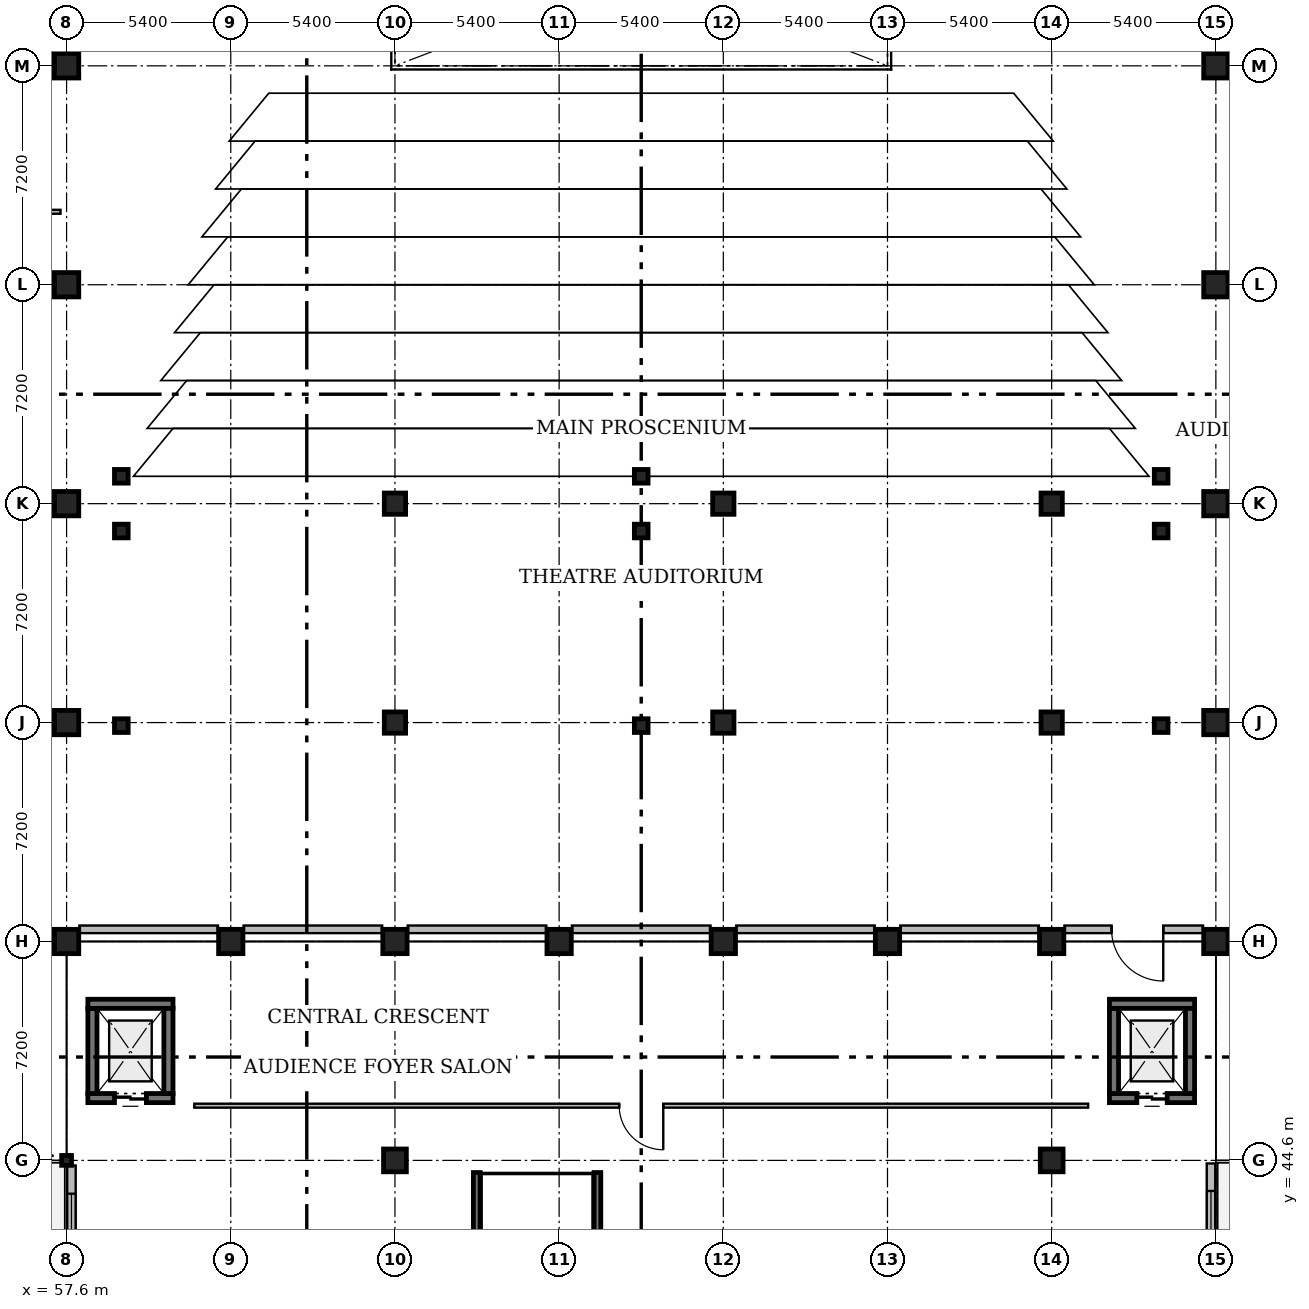
"""IFC4 building model, lengths in metres.
Left out: names, types, materials, properties, quantities, classifications, styles, units other than length and angle.
Written with IfcOpenShell. Run it as: python <this file> out.ifc"""

import sys

from ifc_helpers import new_model, si_unit, direction, frame, frame_2d, origin, origin_2d, place, context, subcontext, project, spatial, rectangle, circle, hollow_circle, extrude, element, fill, save


model = new_model("IFC4")
c1 = context("Model", 3, precision=1e-05, world=origin(), true_north=direction((0.0, 1.0)))
c2 = subcontext(c1, "Body", "Model", "MODEL_VIEW")
j1 = project(units=[si_unit("LENGTHUNIT", "METRE"), si_unit("PLANEANGLEUNIT", "RADIAN")], contexts=[c1])
p1 = place(None, origin())
s1 = spatial("IfcSite", under=j1, at=p1, CompositionType="ELEMENT")
p2 = place(p1, origin())
s2 = spatial("IfcBuilding", under=s1, at=p2, CompositionType="ELEMENT")
p3 = place(p2, origin())
s3 = spatial("IfcBuildingStorey", under=s2, at=p3, CompositionType="ELEMENT", Elevation=0.0)
p4 = place(p3, frame((68.4, 44.6, 0.0), z_axis=(0.0, 0.0, 1.0), x_axis=(1.0, 0.0, 0.0)))
e1 = element("IfcColumn", 1, at=p4, inside=s3, PredefinedType="COLUMN", context=c2, shape_type="SweptSolid", body=[
    extrude(circle(Radius=0.375, at=origin_2d()), origin(), (0.0, 0.0, 1.0), 4.8),
])
p5 = place(p3, frame((68.4, 51.8, 0.0), z_axis=(0.0, 0.0, 1.0), x_axis=(1.0, 0.0, 0.0)))
e2 = element("IfcColumn", 2, at=p5, inside=s3, PredefinedType="COLUMN", context=c2, shape_type="SweptSolid", body=[
    extrude(rectangle(XDim=0.8, YDim=0.8, at=origin_2d()), origin(), (0.0, 0.0, 1.0), 4.8),
])
for number, where, z_axis, x_axis in (
    (3, (68.4, 59.0, 0.0), (0.0, 0.0, 1.0), (1.0, 0.0, 0.0)),
    (4, (68.4, 66.2, 0.0), (0.0, 0.0, 1.0), (1.0, 0.0, 0.0)),
):
    element("IfcColumn", number, at=place(p3, frame(where, z_axis=z_axis, x_axis=x_axis)), inside=s3, PredefinedType="COLUMN", context=c2, shape_type="SweptSolid", body=[
        extrude(rectangle(XDim=0.7, YDim=0.7, at=origin_2d()), origin(), (0.0, 0.0, 1.0), 4.8),
    ])
for number, where, z_axis, x_axis in (
    (5, (73.8, 51.8, 0.0), (0.0, 0.0, 1.0), (1.0, 0.0, 0.0)),
    (6, (79.2, 51.8, 0.0), (0.0, 0.0, 1.0), (1.0, 0.0, 0.0)),
):
    element("IfcColumn", number, at=place(p3, frame(where, z_axis=z_axis, x_axis=x_axis)), inside=s3, PredefinedType="COLUMN", context=c2, shape_type="SweptSolid", body=[
        extrude(rectangle(XDim=0.8, YDim=0.8, at=origin_2d()), origin(), (0.0, 0.0, 1.0), 4.8),
    ])
for number, where, z_axis, x_axis in (
    (7, (79.2, 59.0, 0.0), (0.0, 0.0, 1.0), (1.0, 0.0, 0.0)),
    (8, (79.2, 66.2, 0.0), (0.0, 0.0, 1.0), (1.0, 0.0, 0.0)),
):
    element("IfcColumn", number, at=place(p3, frame(where, z_axis=z_axis, x_axis=x_axis)), inside=s3, PredefinedType="COLUMN", context=c2, shape_type="SweptSolid", body=[
        extrude(rectangle(XDim=0.7, YDim=0.7, at=origin_2d()), origin(), (0.0, 0.0, 1.0), 4.8),
    ])
p6 = place(p3, frame((84.6, 51.8, 0.0), z_axis=(0.0, 0.0, 1.0), x_axis=(1.0, 0.0, 0.0)))
e9 = element("IfcColumn", 9, at=p6, inside=s3, PredefinedType="COLUMN", context=c2, shape_type="SweptSolid", body=[
    extrude(rectangle(XDim=0.8, YDim=0.8, at=origin_2d()), origin(), (0.0, 0.0, 1.0), 4.8),
])
p7 = place(p3, frame((90.0, 44.6, 0.0), z_axis=(0.0, 0.0, 1.0), x_axis=(1.0, 0.0, 0.0)))
e10 = element("IfcColumn", 10, at=p7, inside=s3, PredefinedType="COLUMN", context=c2, shape_type="SweptSolid", body=[
    extrude(circle(Radius=0.375, at=origin_2d()), origin(), (0.0, 0.0, 1.0), 4.8),
])
p8 = place(p3, frame((90.0, 51.8, 0.0), z_axis=(0.0, 0.0, 1.0), x_axis=(1.0, 0.0, 0.0)))
e11 = element("IfcColumn", 11, at=p8, inside=s3, PredefinedType="COLUMN", context=c2, shape_type="SweptSolid", body=[
    extrude(rectangle(XDim=0.8, YDim=0.8, at=origin_2d()), origin(), (0.0, 0.0, 1.0), 4.8),
])
for number, where, z_axis, x_axis in (
    (12, (90.0, 59.0, 0.0), (0.0, 0.0, 1.0), (1.0, 0.0, 0.0)),
    (13, (90.0, 66.2, 0.0), (0.0, 0.0, 1.0), (1.0, 0.0, 0.0)),
):
    element("IfcColumn", number, at=place(p3, frame(where, z_axis=z_axis, x_axis=x_axis)), inside=s3, PredefinedType="COLUMN", context=c2, shape_type="SweptSolid", body=[
        extrude(rectangle(XDim=0.7, YDim=0.7, at=origin_2d()), origin(), (0.0, 0.0, 1.0), 4.8),
    ])
for number, where, z_axis, x_axis in (
    (14, (95.4, 51.8, 0.0), (0.0, 0.0, 1.0), (1.0, 0.0, 0.0)),
    (15, (95.4, 59.0, 0.0), (0.0, 0.0, 1.0), (1.0, 0.0, 0.0)),
    (16, (95.4, 66.2, 0.0), (0.0, 0.0, 1.0), (1.0, 0.0, 0.0)),
    (17, (95.4, 73.4, 0.0), (0.0, 0.0, 1.0), (1.0, 0.0, 0.0)),
    (18, (95.4, 80.6, 0.0), (0.0, 0.0, 1.0), (1.0, 0.0, 0.0)),
):
    element("IfcColumn", number, at=place(p3, frame(where, z_axis=z_axis, x_axis=x_axis)), inside=s3, PredefinedType="COLUMN", context=c2, shape_type="SweptSolid", body=[
        extrude(rectangle(XDim=0.8, YDim=0.8, at=origin_2d()), origin(), (0.0, 0.0, 1.0), 4.8),
    ])
p9 = place(p3, frame((57.6, 44.6, 0.0), z_axis=(0.0, 0.0, 1.0), x_axis=(1.0, 0.0, 0.0)))
e19 = element("IfcColumn", 19, at=p9, inside=s3, PredefinedType="COLUMN", context=c2, shape_type="SweptSolid", body=[
    extrude(hollow_circle(Radius=0.162, WallThickness=0.012, at=origin_2d()), origin(), (0.0, 0.0, 1.0), 4.8),
])
for number, where, z_axis, x_axis in (
    (20, (57.6, 51.8, 0.0), (0.0, 0.0, 1.0), (1.0, 0.0, 0.0)),
    (21, (57.6, 59.0, 0.0), (0.0, 0.0, 1.0), (1.0, 0.0, 0.0)),
    (22, (57.6, 66.2, 0.0), (0.0, 0.0, 1.0), (1.0, 0.0, 0.0)),
    (23, (57.6, 73.4, 0.0), (0.0, 0.0, 1.0), (1.0, 0.0, 0.0)),
    (24, (57.6, 80.6, 0.0), (0.0, 0.0, 1.0), (1.0, 0.0, 0.0)),
    (25, (63.0, 51.8, 0.0), (0.0, 0.0, 1.0), (1.0, 0.0, 0.0)),
):
    element("IfcColumn", number, at=place(p3, frame(where, z_axis=z_axis, x_axis=x_axis)), inside=s3, PredefinedType="COLUMN", context=c2, shape_type="SweptSolid", body=[
        extrude(rectangle(XDim=0.8, YDim=0.8, at=origin_2d()), origin(), (0.0, 0.0, 1.0), 4.8),
    ])
for number, where, z_axis, x_axis in (
    (26, (59.4, 67.1, 0.0), (0.0, 0.0, 1.0), (1.0, 0.0, 0.0)),
    (27, (76.5, 67.1, 0.0), (0.0, 0.0, 1.0), (1.0, 0.0, 0.0)),
    (28, (93.6, 67.1, 0.0), (0.0, 0.0, 1.0), (1.0, 0.0, 0.0)),
):
    element("IfcColumn", number, at=place(p3, frame(where, z_axis=z_axis, x_axis=x_axis)), inside=s3, PredefinedType="COLUMN", context=c2, shape_type="SweptSolid", body=[
        extrude(rectangle(XDim=0.45, YDim=0.45, at=origin_2d()), origin(), (0.0, 0.0, 1.0), 1.46),
    ])
for number, where, z_axis, x_axis in (
    (29, (59.4, 65.3, 0.0), (0.0, 0.0, 1.0), (1.0, 0.0, 0.0)),
    (30, (76.5, 65.3, 0.0), (0.0, 0.0, 1.0), (1.0, 0.0, 0.0)),
    (31, (93.6, 65.3, 0.0), (0.0, 0.0, 1.0), (1.0, 0.0, 0.0)),
    (32, (59.4, 58.9, 0.0), (0.0, 0.0, 1.0), (1.0, 0.0, 0.0)),
    (33, (76.5, 58.9, 0.0), (0.0, 0.0, 1.0), (1.0, 0.0, 0.0)),
    (34, (93.6, 58.9, 0.0), (0.0, 0.0, 1.0), (1.0, 0.0, 0.0)),
):
    element("IfcColumn", number, at=place(p3, frame(where, z_axis=z_axis, x_axis=x_axis)), inside=s3, PredefinedType="COLUMN", context=c2, shape_type="SweptSolid", body=[
        extrude(rectangle(XDim=0.45, YDim=0.45, at=origin_2d()), origin(), (0.0, 0.0, 1.0), 4.8),
    ])
p10 = place(p3, frame((61.1, 46.65, 0.0), z_axis=(0.0, 0.0, 1.0), x_axis=(-1.0, 0.0, 0.0)))
e35 = element("IfcWall", 35, at=p10, inside=s3, PredefinedType="SOLIDWALL", context=c2, shape_type="SweptSolid", body=[
    extrude(rectangle(XDim=2.8, YDim=0.3, at=frame_2d((1.4, 0.0))), origin(), (0.0, 0.0, 1.0), 4.8),
])
p11 = place(p10, frame((0.875, 0.0, 0.0)))
e36 = element("IfcOpeningElement", 36, at=p11, cuts=e35, PredefinedType="OPENING", context=c2, shape_type="SweptSolid", body=[
    extrude(rectangle(XDim=1.05, YDim=2.1, at=frame_2d((0.525, 1.05))), frame((0.0, 0.17, 0.0), z_axis=(0.0, -1.0, 0.0), x_axis=(1.0, 0.0, 0.0)), (0.0, 0.0, 1.0), 0.34),
])
for number, where, z_axis, x_axis in (
    (37, (58.45, 46.8, 0.0), (0.0, 0.0, 1.0), (0.0, 1.0, 0.0)),
    (38, (58.3, 49.75, 0.0), (0.0, 0.0, 1.0), (1.0, 0.0, 0.0)),
    (39, (60.95, 49.6, 0.0), (0.0, 0.0, 1.0), (0.0, -1.0, 0.0)),
):
    element("IfcWall", number, at=place(p3, frame(where, z_axis=z_axis, x_axis=x_axis)), inside=s3, PredefinedType="SOLIDWALL", context=c2, shape_type="SweptSolid", body=[
        extrude(rectangle(XDim=2.8, YDim=0.3, at=frame_2d((1.4, 0.0))), origin(), (0.0, 0.0, 1.0), 4.8),
    ])
p12 = place(p3, frame((94.7, 46.65, 0.0), z_axis=(0.0, 0.0, 1.0), x_axis=(-1.0, 0.0, 0.0)))
e40 = element("IfcWall", 40, at=p12, inside=s3, PredefinedType="SOLIDWALL", context=c2, shape_type="SweptSolid", body=[
    extrude(rectangle(XDim=2.8, YDim=0.3, at=frame_2d((1.4, 0.0))), origin(), (0.0, 0.0, 1.0), 4.8),
])
p13 = place(p12, frame((0.9, 0.0, 0.0)))
e41 = element("IfcOpeningElement", 41, at=p13, cuts=e40, PredefinedType="OPENING", context=c2, shape_type="SweptSolid", body=[
    extrude(rectangle(XDim=1.0, YDim=2.1, at=frame_2d((0.5, 1.05))), frame((0.0, 0.17, 0.0), z_axis=(0.0, -1.0, 0.0), x_axis=(1.0, 0.0, 0.0)), (0.0, 0.0, 1.0), 0.34),
])
for number, where, z_axis, x_axis in (
    (42, (92.05, 46.8, 0.0), (0.0, 0.0, 1.0), (0.0, 1.0, 0.0)),
    (43, (91.9, 49.75, 0.0), (0.0, 0.0, 1.0), (1.0, 0.0, 0.0)),
    (44, (94.55, 49.6, 0.0), (0.0, 0.0, 1.0), (0.0, -1.0, 0.0)),
):
    element("IfcWall", number, at=place(p3, frame(where, z_axis=z_axis, x_axis=x_axis)), inside=s3, PredefinedType="SOLIDWALL", context=c2, shape_type="SweptSolid", body=[
        extrude(rectangle(XDim=2.8, YDim=0.3, at=frame_2d((1.4, 0.0))), origin(), (0.0, 0.0, 1.0), 4.8),
    ])
for number, where, z_axis, x_axis in (
    (45, (71.09, 36.6, 0.0), (0.0, 0.0, 1.0), (0.0, 1.0, 0.0)),
    (46, (75.06, 36.6, 0.0), (0.0, 0.0, 1.0), (0.0, 1.0, 0.0)),
):
    element("IfcWall", number, at=place(p3, frame(where, z_axis=z_axis, x_axis=x_axis)), inside=s3, PredefinedType="SOLIDWALL", context=c2, shape_type="SweptSolid", body=[
        extrude(rectangle(XDim=7.6, YDim=0.22, at=frame_2d((3.8, 0.0))), origin(), (0.0, 0.0, 1.0), 4.8),
    ])
p14 = place(p3, frame((57.76, 37.78, 0.0), z_axis=(0.0, 0.0, 1.0), x_axis=(0.0, 1.0, 0.0)))
e47 = element("IfcWall", 47, at=p14, inside=s3, PredefinedType="SOLIDWALL", context=c2, shape_type="SweptSolid", body=[
    extrude(rectangle(XDim=6.653, YDim=0.28, at=frame_2d((3.327, 0.0))), origin(), (0.0, 0.0, 1.0), 3.873),
])
p15 = place(p14, frame((0.928, 0.0, 0.95)))
e48 = element("IfcOpeningElement", 48, at=p15, cuts=e47, PredefinedType="OPENING", context=c2, shape_type="SweptSolid", body=[
    extrude(rectangle(XDim=1.47, YDim=1.95, at=frame_2d((0.735, 0.975))), frame((0.0, 0.16, 0.0), z_axis=(0.0, -1.0, 0.0), x_axis=(1.0, 0.0, 0.0)), (0.0, 0.0, 1.0), 0.32),
])
p16 = place(p14, frame((4.255, 0.0, 0.95)))
e49 = element("IfcOpeningElement", 49, at=p16, cuts=e47, PredefinedType="OPENING", context=c2, shape_type="SweptSolid", body=[
    extrude(rectangle(XDim=1.47, YDim=1.95, at=frame_2d((0.735, 0.975))), frame((0.0, 0.16, 0.0), z_axis=(0.0, -1.0, 0.0), x_axis=(1.0, 0.0, 0.0)), (0.0, 0.0, 1.0), 0.32),
])
p17 = place(p3, frame((95.24, 37.78, 0.0), z_axis=(0.0, 0.0, 1.0), x_axis=(0.0, 1.0, 0.0)))
e50 = element("IfcWall", 50, at=p17, inside=s3, PredefinedType="SOLIDWALL", context=c2, shape_type="SweptSolid", body=[
    extrude(rectangle(XDim=6.72, YDim=0.28, at=frame_2d((3.36, 0.0))), origin(), (0.0, 0.0, 1.0), 3.323),
])
p18 = place(p17, frame((0.905, 0.0, 0.95)))
e51 = element("IfcOpeningElement", 51, at=p18, cuts=e50, PredefinedType="OPENING", context=c2, shape_type="SweptSolid", body=[
    extrude(rectangle(XDim=1.55, YDim=1.8, at=frame_2d((0.775, 0.9))), frame((0.0, 0.16, 0.0), z_axis=(0.0, -1.0, 0.0), x_axis=(1.0, 0.0, 0.0)), (0.0, 0.0, 1.0), 0.32),
])
p19 = place(p17, frame((4.265, 0.0, 0.95)))
e52 = element("IfcOpeningElement", 52, at=p19, cuts=e50, PredefinedType="OPENING", context=c2, shape_type="SweptSolid", body=[
    extrude(rectangle(XDim=1.55, YDim=1.8, at=frame_2d((0.775, 0.9))), frame((0.0, 0.16, 0.0), z_axis=(0.0, -1.0, 0.0), x_axis=(1.0, 0.0, 0.0)), (0.0, 0.0, 1.0), 0.32),
])
p20 = place(p3, frame((94.98, 52.2, 0.0), z_axis=(0.0, 0.0, 1.0), x_axis=(-1.0, 0.0, 0.0)))
e53 = element("IfcWall", 53, at=p20, inside=s3, PredefinedType="PARTITIONING", context=c2, shape_type="SweptSolid", body=[
    extrude(rectangle(XDim=4.56, YDim=0.25, at=frame_2d((2.28, 0.0))), origin(), (0.0, 0.0, 1.0), 4.54),
])
p21 = place(p20, frame((1.31, 0.0, 0.0)))
e54 = element("IfcOpeningElement", 54, at=p21, cuts=e53, PredefinedType="OPENING", context=c2, shape_type="SweptSolid", body=[
    extrude(rectangle(XDim=1.7, YDim=2.25, at=frame_2d((0.85, 1.125))), frame((0.0, 0.145, 0.0), z_axis=(0.0, -1.0, 0.0), x_axis=(1.0, 0.0, 0.0)), (0.0, 0.0, 1.0), 0.29),
])
p22 = place(p3, frame((89.58, 52.2, 0.0), z_axis=(0.0, 0.0, 1.0), x_axis=(-1.0, 0.0, 0.0)))
e55 = element("IfcWall", 55, at=p22, inside=s3, PredefinedType="PARTITIONING", context=c2, shape_type="SweptSolid", body=[
    extrude(rectangle(XDim=4.56, YDim=0.25, at=frame_2d((2.28, 0.0))), origin(), (0.0, 0.0, 1.0), 4.54),
])
p23 = place(p3, frame((84.18, 52.2, 0.0), z_axis=(0.0, 0.0, 1.0), x_axis=(-1.0, 0.0, 0.0)))
e56 = element("IfcWall", 56, at=p23, inside=s3, PredefinedType="PARTITIONING", context=c2, shape_type="SweptSolid", body=[
    extrude(rectangle(XDim=4.56, YDim=0.25, at=frame_2d((2.28, 0.0))), origin(), (0.0, 0.0, 1.0), 4.54),
])
p24 = place(p3, frame((78.78, 52.2, 0.0), z_axis=(0.0, 0.0, 1.0), x_axis=(-1.0, 0.0, 0.0)))
e57 = element("IfcWall", 57, at=p24, inside=s3, PredefinedType="PARTITIONING", context=c2, shape_type="SweptSolid", body=[
    extrude(rectangle(XDim=4.56, YDim=0.25, at=frame_2d((2.28, 0.0))), origin(), (0.0, 0.0, 1.0), 4.54),
])
p25 = place(p3, frame((73.38, 52.2, 0.0), z_axis=(0.0, 0.0, 1.0), x_axis=(-1.0, 0.0, 0.0)))
e58 = element("IfcWall", 58, at=p25, inside=s3, PredefinedType="PARTITIONING", context=c2, shape_type="SweptSolid", body=[
    extrude(rectangle(XDim=4.56, YDim=0.25, at=frame_2d((2.28, 0.0))), origin(), (0.0, 0.0, 1.0), 4.54),
])
for number, where, z_axis, x_axis in (
    (59, (67.98, 52.2, 0.0), (0.0, 0.0, 1.0), (-1.0, 0.0, 0.0)),
    (60, (62.58, 52.2, 0.0), (0.0, 0.0, 1.0), (-1.0, 0.0, 0.0)),
):
    element("IfcWall", number, at=place(p3, frame(where, z_axis=z_axis, x_axis=x_axis)), inside=s3, PredefinedType="PARTITIONING", context=c2, shape_type="SweptSolid", body=[
        extrude(rectangle(XDim=4.56, YDim=0.25, at=frame_2d((2.28, 0.0))), origin(), (0.0, 0.0, 1.0), 4.54),
    ])
p26 = place(p3, frame((91.2, 46.4, 0.0), z_axis=(0.0, 0.0, 1.0), x_axis=(-1.0, 0.0, 0.0)))
e61 = element("IfcWall", 61, at=p26, inside=s3, PredefinedType="PARTITIONING", context=c2, shape_type="SweptSolid", body=[
    extrude(rectangle(XDim=29.4, YDim=0.13, at=frame_2d((14.7, 0.0))), origin(), (0.0, 0.0, 1.0), 4.54),
])
p27 = place(p26, frame((13.975, 0.0, 0.0)))
e62 = element("IfcOpeningElement", 62, at=p27, cuts=e61, PredefinedType="OPENING", context=c2, shape_type="SweptSolid", body=[
    extrude(rectangle(XDim=1.45, YDim=2.2, at=frame_2d((0.725, 1.1))), frame((0.0, 0.085, 0.0), z_axis=(0.0, -1.0, 0.0), x_axis=(1.0, 0.0, 0.0)), (0.0, 0.0, 1.0), 0.17),
])
p28 = place(p3, frame((56.24, 75.8, 0.0), z_axis=(0.0, 0.0, 1.0), x_axis=(1.0, 0.0, 0.0)))
e63 = element("IfcWall", 63, at=p28, inside=s3, PredefinedType="PARTITIONING", context=c2, shape_type="SweptSolid", body=[
    extrude(rectangle(XDim=1.16, YDim=0.13, at=frame_2d((0.58, 0.0))), origin(), (0.0, 0.0, 1.0), 4.54),
])
p29 = place(p11, origin())
e64 = element("IfcDoor", 64, at=p29, inside=s3, OperationType="DOUBLE_DOOR_SLIDING", PredefinedType="DOOR", context=c2, shape_type="SweptSolid", body=[
    extrude(rectangle(XDim=1.05, YDim=2.1, at=frame_2d((0.525, 1.05))), frame((0.0, 0.025, 0.0), z_axis=(0.0, -1.0, 0.0), x_axis=(1.0, 0.0, 0.0)), (0.0, 0.0, 1.0), 0.05),
])
fill(e36, e64)
p30 = place(p13, origin())
e65 = element("IfcDoor", 65, at=p30, inside=s3, OperationType="DOUBLE_DOOR_SLIDING", PredefinedType="DOOR", context=c2, shape_type="SweptSolid", body=[
    extrude(rectangle(XDim=1.0, YDim=2.1, at=frame_2d((0.5, 1.05))), frame((0.0, 0.025, 0.0), z_axis=(0.0, -1.0, 0.0), x_axis=(1.0, 0.0, 0.0)), (0.0, 0.0, 1.0), 0.05),
])
fill(e41, e65)
p31 = place(p16, origin())
e66 = element("IfcWindow", 66, at=p31, inside=s3, PartitioningType="SINGLE_PANEL", PredefinedType="WINDOW", context=c2, shape_type="SweptSolid", body=[
    extrude(rectangle(XDim=1.47, YDim=1.95, at=frame_2d((0.735, 0.975))), frame((0.0, 0.03, 0.0), z_axis=(0.0, -1.0, 0.0), x_axis=(1.0, 0.0, 0.0)), (0.0, 0.0, 1.0), 0.06),
])
fill(e49, e66)
p32 = place(p19, origin())
e67 = element("IfcWindow", 67, at=p32, inside=s3, PartitioningType="SINGLE_PANEL", PredefinedType="WINDOW", context=c2, shape_type="SweptSolid", body=[
    extrude(rectangle(XDim=1.55, YDim=1.8, at=frame_2d((0.775, 0.9))), frame((0.0, 0.03, 0.0), z_axis=(0.0, -1.0, 0.0), x_axis=(1.0, 0.0, 0.0)), (0.0, 0.0, 1.0), 0.06),
])
fill(e52, e67)
p33 = place(p21, origin())
e68 = element("IfcDoor", 68, at=p33, inside=s3, OperationType="DOUBLE_DOOR_SINGLE_SWING", PredefinedType="DOOR", context=c2, shape_type="SweptSolid", body=[
    extrude(rectangle(XDim=1.7, YDim=2.25, at=frame_2d((0.85, 1.125))), frame((0.0, 0.025, 0.0), z_axis=(0.0, -1.0, 0.0), x_axis=(1.0, 0.0, 0.0)), (0.0, 0.0, 1.0), 0.05),
])
fill(e54, e68)
p34 = place(p27, origin())
e69 = element("IfcDoor", 69, at=p34, inside=s3, OperationType="DOUBLE_DOOR_SINGLE_SWING", PredefinedType="DOOR", context=c2, shape_type="SweptSolid", body=[
    extrude(rectangle(XDim=1.45, YDim=2.2, at=frame_2d((0.725, 1.1))), frame((0.0, 0.025, 0.0), z_axis=(0.0, -1.0, 0.0), x_axis=(1.0, 0.0, 0.0)), (0.0, 0.0, 1.0), 0.05),
])
fill(e62, e69)
save(model, sys.argv[1])
